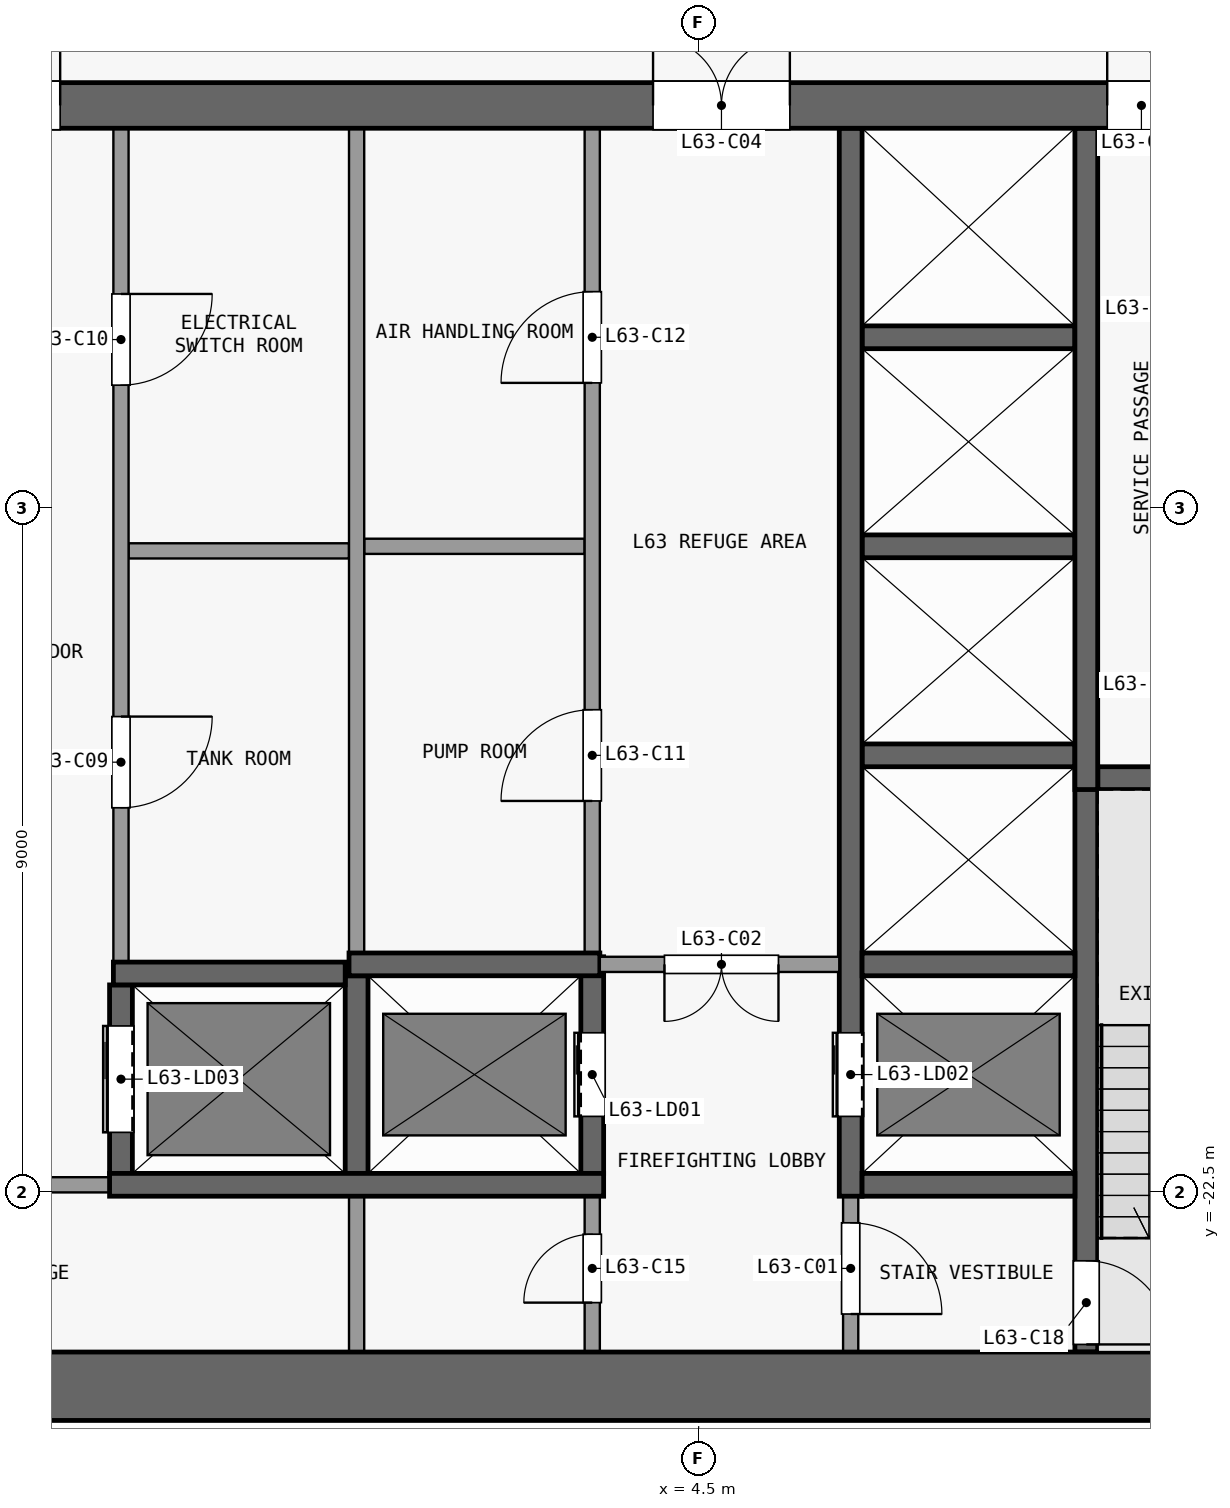
"""IFC4 building model, lengths in metres.
Left out: names, types, materials, properties, quantities, classifications, styles, units other than length and angle.
Written with IfcOpenShell. Run it as: python <this file> out.ifc"""

import sys

from ifc_helpers import new_model, si_unit, direction, frame, frame_2d, origin, place, context, subcontext, project, spatial, rectangle, extrude, element, fill, save


model = new_model("IFC4")
c1 = context("Model", 3, precision=1e-05, world=origin(), true_north=direction((0.0, 1.0)))
c2 = subcontext(c1, "Body", "Model", "MODEL_VIEW")
j1 = project(units=[si_unit("LENGTHUNIT", "METRE"), si_unit("PLANEANGLEUNIT", "RADIAN")], contexts=[c1])
p1 = place(None, origin())
s1 = spatial("IfcSite", under=j1, at=p1, CompositionType="ELEMENT")
p2 = place(p1, origin())
s2 = spatial("IfcBuilding", under=s1, at=p2, CompositionType="ELEMENT")
p3 = place(p2, frame((0.0, 0.0, 248.3)))
s3 = spatial("IfcBuildingStorey", under=s2, at=p3, CompositionType="ELEMENT", Elevation=248.3)
p4 = place(p3, frame((-13.5, -25.05, 0.0), z_axis=(0.0, 0.0, 1.0), x_axis=(1.0, 0.0, 0.0)))
e1 = element("IfcWall", 1, at=p4, inside=s3, PredefinedType="SHEAR", context=c2, shape_type="SweptSolid", body=[
    extrude(rectangle(XDim=27.0, YDim=0.9, at=frame_2d((13.5, 0.0))), origin(), (0.0, 0.0, 1.0), 6.9),
])
p5 = place(p3, frame((-13.5, -8.2, 0.0), z_axis=(0.0, 0.0, 1.0), x_axis=(1.0, 0.0, 0.0)))
e2 = element("IfcWall", 2, at=p5, inside=s3, PredefinedType="SHEAR", context=c2, shape_type="SweptSolid", body=[
    extrude(rectangle(XDim=27.0, YDim=0.6, at=frame_2d((13.5, 0.0))), origin(), (0.0, 0.0, 1.0), 6.9),
])
p6 = place(p5, frame((7.8, 0.0, 0.0)))
e3 = element("IfcOpeningElement", 3, at=p6, cuts=e2, PredefinedType="OPENING", context=c2, shape_type="SweptSolid", body=[
    extrude(rectangle(XDim=1.8, YDim=2.1, at=frame_2d((0.9, 1.05))), frame((0.0, 0.31, 0.0), z_axis=(0.0, -1.0, 0.0), x_axis=(1.0, 0.0, 0.0)), (0.0, 0.0, 1.0), 0.62),
])
p7 = place(p5, frame((17.4, 0.0, 0.0)))
e4 = element("IfcOpeningElement", 4, at=p7, cuts=e2, PredefinedType="OPENING", context=c2, shape_type="SweptSolid", body=[
    extrude(rectangle(XDim=1.8, YDim=2.1, at=frame_2d((0.9, 1.05))), frame((0.0, 0.31, 0.0), z_axis=(0.0, -1.0, 0.0), x_axis=(1.0, 0.0, 0.0)), (0.0, 0.0, 1.0), 0.62),
])
p8 = place(p5, frame((1.725, 0.0, 0.0)))
e5 = element("IfcOpeningElement", 5, at=p8, cuts=e2, PredefinedType="OPENING", context=c2, shape_type="SweptSolid", body=[
    extrude(rectangle(XDim=1.2, YDim=2.1, at=frame_2d((0.6, 1.05))), frame((0.0, 0.31, 0.0), z_axis=(0.0, -1.0, 0.0), x_axis=(1.0, 0.0, 0.0)), (0.0, 0.0, 1.0), 0.62),
])
p9 = place(p5, frame((23.375, 0.0, 0.0)))
e6 = element("IfcOpeningElement", 6, at=p9, cuts=e2, PredefinedType="OPENING", context=c2, shape_type="SweptSolid", body=[
    extrude(rectangle(XDim=0.9, YDim=2.1, at=frame_2d((0.45, 1.05))), frame((0.0, 0.31, 0.0), z_axis=(0.0, -1.0, 0.0), x_axis=(1.0, 0.0, 0.0)), (0.0, 0.0, 1.0), 0.62),
])
p10 = place(p3, frame((-3.25, -22.4, 0.0), z_axis=(0.0, 0.0, 1.0), x_axis=(-1.0, 0.0, 0.0)))
e7 = element("IfcWall", 7, at=p10, inside=s3, PredefinedType="PARTITIONING", context=c2, shape_type="SweptSolid", body=[
    extrude(rectangle(XDim=3.15, YDim=0.2, at=frame_2d((1.575, 0.0))), origin(), (0.0, 0.0, 1.0), 6.9),
])
p11 = place(p10, frame((0.8, 0.0, 0.0)))
e8 = element("IfcOpeningElement", 8, at=p11, cuts=e7, PredefinedType="OPENING", context=c2, shape_type="SweptSolid", body=[
    extrude(rectangle(XDim=1.5, YDim=2.1, at=frame_2d((0.75, 1.05))), frame((0.0, 0.11, 0.0), z_axis=(0.0, -1.0, 0.0), x_axis=(1.0, 0.0, 0.0)), (0.0, 0.0, 1.0), 0.22),
])
p12 = place(p3, frame((-3.25, -22.4, 0.0), z_axis=(0.0, 0.0, 1.0), x_axis=(1.0, 0.0, 0.0)))
e9 = element("IfcWall", 9, at=p12, inside=s3, PredefinedType="SHEAR", context=c2, shape_type="SweptSolid", body=[
    extrude(rectangle(XDim=6.5, YDim=0.3, at=frame_2d((3.25, 0.0))), origin(), (0.0, 0.0, 1.0), 6.9),
])
p13 = place(p3, frame((6.65, -22.4, 0.0), z_axis=(0.0, 0.0, 1.0), x_axis=(1.0, 0.0, 0.0)))
e10 = element("IfcWall", 10, at=p13, inside=s3, PredefinedType="SHEAR", context=c2, shape_type="SweptSolid", body=[
    extrude(rectangle(XDim=2.8, YDim=0.3, at=frame_2d((1.4, 0.0))), origin(), (0.0, 0.0, 1.0), 6.9),
])
p14 = place(p3, frame((-3.2, -19.62, 0.0), z_axis=(0.0, 0.0, 1.0), x_axis=(1.0, 0.0, 0.0)))
e11 = element("IfcWall", 11, at=p14, inside=s3, PredefinedType="SHEAR", context=c2, shape_type="SweptSolid", body=[
    extrude(rectangle(XDim=3.05, YDim=0.3, at=frame_2d((1.525, 0.0))), origin(), (0.0, 0.0, 1.0), 6.9),
])
p15 = place(p3, frame((-0.1, -19.5, 0.0), z_axis=(0.0, 0.0, 1.0), x_axis=(1.0, 0.0, 0.0)))
e12 = element("IfcWall", 12, at=p15, inside=s3, PredefinedType="SHEAR", context=c2, shape_type="SweptSolid", body=[
    extrude(rectangle(XDim=3.3, YDim=0.3, at=frame_2d((1.65, 0.0))), origin(), (0.0, 0.0, 1.0), 6.9),
])
p16 = place(p3, frame((6.35, -19.5, 0.0), z_axis=(0.0, 0.0, 1.0), x_axis=(-1.0, 0.0, 0.0)))
e13 = element("IfcWall", 13, at=p16, inside=s3, PredefinedType="PARTITIONING", context=c2, shape_type="SweptSolid", body=[
    extrude(rectangle(XDim=3.15, YDim=0.2, at=frame_2d((1.575, 0.0))), origin(), (0.0, 0.0, 1.0), 6.9),
])
p17 = place(p16, frame((0.8, 0.0, 0.0)))
e14 = element("IfcOpeningElement", 14, at=p17, cuts=e13, PredefinedType="OPENING", context=c2, shape_type="SweptSolid", body=[
    extrude(rectangle(XDim=1.5, YDim=2.1, at=frame_2d((0.75, 1.05))), frame((0.0, 0.11, 0.0), z_axis=(0.0, -1.0, 0.0), x_axis=(1.0, 0.0, 0.0)), (0.0, 0.0, 1.0), 0.22),
])
p18 = place(p3, frame((6.65, -19.5, 0.0), z_axis=(0.0, 0.0, 1.0), x_axis=(1.0, 0.0, 0.0)))
e15 = element("IfcWall", 15, at=p18, inside=s3, PredefinedType="SHEAR", context=c2, shape_type="SweptSolid", body=[
    extrude(rectangle(XDim=2.8, YDim=0.3, at=frame_2d((1.4, 0.0))), origin(), (0.0, 0.0, 1.0), 6.9),
])
p19 = place(p3, frame((9.75, -17.05, 0.0), z_axis=(0.0, 0.0, 1.0), x_axis=(1.0, 0.0, 0.0)))
e16 = element("IfcWall", 16, at=p19, inside=s3, PredefinedType="SHEAR", context=c2, shape_type="SweptSolid", body=[
    extrude(rectangle(XDim=2.85, YDim=0.3, at=frame_2d((1.425, 0.0))), origin(), (0.0, 0.0, 1.0), 6.9),
])
p20 = place(p3, frame((6.65, -16.75, 0.0), z_axis=(0.0, 0.0, 1.0), x_axis=(1.0, 0.0, 0.0)))
e17 = element("IfcWall", 17, at=p20, inside=s3, PredefinedType="SHEAR", context=c2, shape_type="SweptSolid", body=[
    extrude(rectangle(XDim=2.8, YDim=0.3, at=frame_2d((1.4, 0.0))), origin(), (0.0, 0.0, 1.0), 6.9),
])
for number, where, z_axis, x_axis in (
    (18, (-3.0, -14.06, 0.0), (0.0, 0.0, 1.0), (1.0, 0.0, 0.0)),
    (19, (0.1, -14.0, 0.0), (0.0, 0.0, 1.0), (1.0, 0.0, 0.0)),
):
    element("IfcWall", number, at=place(p3, frame(where, z_axis=z_axis, x_axis=x_axis)), inside=s3, PredefinedType="PARTITIONING", context=c2, shape_type="SweptSolid", body=[
        extrude(rectangle(XDim=2.9, YDim=0.2, at=frame_2d((1.45, 0.0))), origin(), (0.0, 0.0, 1.0), 6.9),
    ])
for number, where, z_axis, x_axis in (
    (20, (6.65, -14.0, 0.0), (0.0, 0.0, 1.0), (1.0, 0.0, 0.0)),
    (21, (6.65, -11.25, 0.0), (0.0, 0.0, 1.0), (1.0, 0.0, 0.0)),
):
    element("IfcWall", number, at=place(p3, frame(where, z_axis=z_axis, x_axis=x_axis)), inside=s3, PredefinedType="SHEAR", context=c2, shape_type="SweptSolid", body=[
        extrude(rectangle(XDim=2.8, YDim=0.3, at=frame_2d((1.4, 0.0))), origin(), (0.0, 0.0, 1.0), 6.9),
    ])
p21 = place(p3, frame((-3.1, -22.25, 0.0), z_axis=(0.0, 0.0, 1.0), x_axis=(0.0, 1.0, 0.0)))
e22 = element("IfcWall", 22, at=p21, inside=s3, PredefinedType="SHEAR", context=c2, shape_type="SweptSolid", body=[
    extrude(rectangle(XDim=2.48, YDim=0.3, at=frame_2d((1.24, 0.0))), origin(), (0.0, 0.0, 1.0), 6.9),
])
p22 = place(p21, frame((0.54, 0.0, 0.0)))
e23 = element("IfcOpeningElement", 23, at=p22, cuts=e22, PredefinedType="OPENING", context=c2, shape_type="SweptSolid", body=[
    extrude(rectangle(XDim=1.4, YDim=2.1, at=frame_2d((0.7, 1.05))), frame((0.0, 0.16, 0.0), z_axis=(0.0, -1.0, 0.0), x_axis=(1.0, 0.0, 0.0)), (0.0, 0.0, 1.0), 0.32),
])
p23 = place(p3, frame((-3.1, -8.5, 0.0), z_axis=(0.0, 0.0, 1.0), x_axis=(0.0, -1.0, 0.0)))
e24 = element("IfcWall", 24, at=p23, inside=s3, PredefinedType="PARTITIONING", context=c2, shape_type="SweptSolid", body=[
    extrude(rectangle(XDim=10.97, YDim=0.2, at=frame_2d((5.485, 0.0))), origin(), (0.0, 0.0, 1.0), 6.9),
])
p24 = place(p23, frame((7.74, 0.0, 0.0)))
e25 = element("IfcOpeningElement", 25, at=p24, cuts=e24, PredefinedType="OPENING", context=c2, shape_type="SweptSolid", body=[
    extrude(rectangle(XDim=1.2, YDim=2.1, at=frame_2d((0.6, 1.05))), frame((0.0, 0.11, 0.0), z_axis=(0.0, -1.0, 0.0), x_axis=(1.0, 0.0, 0.0)), (0.0, 0.0, 1.0), 0.22),
])
p25 = place(p23, frame((2.18, 0.0, 0.0)))
e26 = element("IfcOpeningElement", 26, at=p25, cuts=e24, PredefinedType="OPENING", context=c2, shape_type="SweptSolid", body=[
    extrude(rectangle(XDim=1.2, YDim=2.1, at=frame_2d((0.6, 1.05))), frame((0.0, 0.11, 0.0), z_axis=(0.0, -1.0, 0.0), x_axis=(1.0, 0.0, 0.0)), (0.0, 0.0, 1.0), 0.22),
])
p26 = place(p3, frame((0.0, -24.6, 0.0), z_axis=(0.0, 0.0, 1.0), x_axis=(0.0, 1.0, 0.0)))
e27 = element("IfcWall", 27, at=p26, inside=s3, PredefinedType="PARTITIONING", context=c2, shape_type="SweptSolid", body=[
    extrude(rectangle(XDim=2.05, YDim=0.2, at=frame_2d((1.025, 0.0))), origin(), (0.0, 0.0, 1.0), 6.9),
])
p27 = place(p3, frame((0.0, -22.25, 0.0), z_axis=(0.0, 0.0, 1.0), x_axis=(0.0, 1.0, 0.0)))
e28 = element("IfcWall", 28, at=p27, inside=s3, PredefinedType="SHEAR", context=c2, shape_type="SweptSolid", body=[
    extrude(rectangle(XDim=2.6, YDim=0.3, at=frame_2d((1.3, 0.0))), origin(), (0.0, 0.0, 1.0), 6.9),
])
p28 = place(p3, frame((0.0, -19.35, 0.0), z_axis=(0.0, 0.0, 1.0), x_axis=(0.0, 1.0, 0.0)))
e29 = element("IfcWall", 29, at=p28, inside=s3, PredefinedType="PARTITIONING", context=c2, shape_type="SweptSolid", body=[
    extrude(rectangle(XDim=10.85, YDim=0.2, at=frame_2d((5.425, 0.0))), origin(), (0.0, 0.0, 1.0), 6.9),
])
p29 = place(p3, frame((3.1, -24.6, 0.0), z_axis=(0.0, 0.0, 1.0), x_axis=(0.0, 1.0, 0.0)))
e30 = element("IfcWall", 30, at=p29, inside=s3, PredefinedType="PARTITIONING", context=c2, shape_type="SweptSolid", body=[
    extrude(rectangle(XDim=2.05, YDim=0.2, at=frame_2d((1.025, 0.0))), origin(), (0.0, 0.0, 1.0), 6.9),
])
p30 = place(p29, frame((0.65, 0.0, 0.0)))
e31 = element("IfcOpeningElement", 31, at=p30, cuts=e30, PredefinedType="OPENING", context=c2, shape_type="SweptSolid", body=[
    extrude(rectangle(XDim=0.9, YDim=2.1, at=frame_2d((0.45, 1.05))), frame((0.0, 0.11, 0.0), z_axis=(0.0, -1.0, 0.0), x_axis=(1.0, 0.0, 0.0)), (0.0, 0.0, 1.0), 0.22),
])
p31 = place(p3, frame((3.1, -22.25, 0.0), z_axis=(0.0, 0.0, 1.0), x_axis=(0.0, 1.0, 0.0)))
e32 = element("IfcWall", 32, at=p31, inside=s3, PredefinedType="SHEAR", context=c2, shape_type="SweptSolid", body=[
    extrude(rectangle(XDim=2.85, YDim=0.3, at=frame_2d((1.425, 0.0))), origin(), (0.0, 0.0, 1.0), 6.9),
])
p32 = place(p31, frame((0.75, 0.0, 0.0)))
e33 = element("IfcOpeningElement", 33, at=p32, cuts=e32, PredefinedType="OPENING", context=c2, shape_type="SweptSolid", body=[
    extrude(rectangle(XDim=1.1, YDim=2.1, at=frame_2d((0.55, 1.05))), frame((0.0, 0.16, 0.0), z_axis=(0.0, -1.0, 0.0), x_axis=(1.0, 0.0, 0.0)), (0.0, 0.0, 1.0), 0.32),
])
p33 = place(p3, frame((3.1, -19.6, 0.0), z_axis=(0.0, 0.0, 1.0), x_axis=(0.0, 1.0, 0.0)))
e34 = element("IfcWall", 34, at=p33, inside=s3, PredefinedType="PARTITIONING", context=c2, shape_type="SweptSolid", body=[
    extrude(rectangle(XDim=11.1, YDim=0.2, at=frame_2d((5.55, 0.0))), origin(), (0.0, 0.0, 1.0), 6.9),
])
p34 = place(p33, frame((2.25, 0.0, 0.0)))
e35 = element("IfcOpeningElement", 35, at=p34, cuts=e34, PredefinedType="OPENING", context=c2, shape_type="SweptSolid", body=[
    extrude(rectangle(XDim=1.2, YDim=2.1, at=frame_2d((0.6, 1.05))), frame((0.0, 0.11, 0.0), z_axis=(0.0, -1.0, 0.0), x_axis=(1.0, 0.0, 0.0)), (0.0, 0.0, 1.0), 0.22),
])
p35 = place(p33, frame((7.75, 0.0, 0.0)))
e36 = element("IfcOpeningElement", 36, at=p35, cuts=e34, PredefinedType="OPENING", context=c2, shape_type="SweptSolid", body=[
    extrude(rectangle(XDim=1.2, YDim=2.1, at=frame_2d((0.6, 1.05))), frame((0.0, 0.11, 0.0), z_axis=(0.0, -1.0, 0.0), x_axis=(1.0, 0.0, 0.0)), (0.0, 0.0, 1.0), 0.22),
])
p36 = place(p3, frame((6.5, -22.55, 0.0), z_axis=(0.0, 0.0, 1.0), x_axis=(0.0, -1.0, 0.0)))
e37 = element("IfcWall", 37, at=p36, inside=s3, PredefinedType="PARTITIONING", context=c2, shape_type="SweptSolid", body=[
    extrude(rectangle(XDim=2.05, YDim=0.2, at=frame_2d((1.025, 0.0))), origin(), (0.0, 0.0, 1.0), 6.9),
])
p37 = place(p36, frame((0.35, 0.0, 0.0)))
e38 = element("IfcOpeningElement", 38, at=p37, cuts=e37, PredefinedType="OPENING", context=c2, shape_type="SweptSolid", body=[
    extrude(rectangle(XDim=1.2, YDim=2.1, at=frame_2d((0.6, 1.05))), frame((0.0, 0.11, 0.0), z_axis=(0.0, -1.0, 0.0), x_axis=(1.0, 0.0, 0.0)), (0.0, 0.0, 1.0), 0.22),
])
p38 = place(p3, frame((6.5, -22.55, 0.0), z_axis=(0.0, 0.0, 1.0), x_axis=(0.0, 1.0, 0.0)))
e39 = element("IfcWall", 39, at=p38, inside=s3, PredefinedType="SHEAR", context=c2, shape_type="SweptSolid", body=[
    extrude(rectangle(XDim=14.05, YDim=0.3, at=frame_2d((7.025, 0.0))), origin(), (0.0, 0.0, 1.0), 6.9),
])
p39 = place(p38, frame((1.05, 0.0, 0.0)))
e40 = element("IfcOpeningElement", 40, at=p39, cuts=e39, PredefinedType="OPENING", context=c2, shape_type="SweptSolid", body=[
    extrude(rectangle(XDim=1.1, YDim=2.1, at=frame_2d((0.55, 1.05))), frame((0.0, 0.16, 0.0), z_axis=(0.0, -1.0, 0.0), x_axis=(1.0, 0.0, 0.0)), (0.0, 0.0, 1.0), 0.32),
])
p40 = place(p3, frame((9.6, -16.9, 0.0), z_axis=(0.0, 0.0, 1.0), x_axis=(0.0, -1.0, 0.0)))
e41 = element("IfcWall", 41, at=p40, inside=s3, PredefinedType="SHEAR", context=c2, shape_type="SweptSolid", body=[
    extrude(rectangle(XDim=7.7, YDim=0.3, at=frame_2d((3.85, 0.0))), origin(), (0.0, 0.0, 1.0), 6.9),
])
p41 = place(p40, frame((6.5, 0.0, 0.0)))
e42 = element("IfcOpeningElement", 42, at=p41, cuts=e41, PredefinedType="OPENING", context=c2, shape_type="SweptSolid", body=[
    extrude(rectangle(XDim=1.1, YDim=2.1, at=frame_2d((0.55, 1.05))), frame((0.0, 0.16, 0.0), z_axis=(0.0, -1.0, 0.0), x_axis=(1.0, 0.0, 0.0)), (0.0, 0.0, 1.0), 0.32),
])
p42 = place(p3, frame((9.6, -17.2, 0.0), z_axis=(0.0, 0.0, 1.0), x_axis=(0.0, 1.0, 0.0)))
e43 = element("IfcWall", 43, at=p42, inside=s3, PredefinedType="SHEAR", context=c2, shape_type="SweptSolid", body=[
    extrude(rectangle(XDim=8.7, YDim=0.3, at=frame_2d((4.35, 0.0))), origin(), (0.0, 0.0, 1.0), 6.9),
])
p43 = place(p32, origin())
e44 = element("IfcDoor", 44, at=p43, inside=s3, OperationType="DOUBLE_DOOR_SLIDING", PredefinedType="DOOR", context=c2, shape_type="SweptSolid", body=[
    extrude(rectangle(XDim=1.1, YDim=2.1, at=frame_2d((0.55, 1.05))), frame((0.0, 0.025, 0.0), z_axis=(0.0, -1.0, 0.0), x_axis=(1.0, 0.0, 0.0)), (0.0, 0.0, 1.0), 0.05),
])
fill(e33, e44)
p44 = place(p39, origin())
e45 = element("IfcDoor", 45, at=p44, inside=s3, OperationType="DOUBLE_DOOR_SLIDING", PredefinedType="DOOR", context=c2, shape_type="SweptSolid", body=[
    extrude(rectangle(XDim=1.1, YDim=2.1, at=frame_2d((0.55, 1.05))), frame((0.0, 0.025, 0.0), z_axis=(0.0, -1.0, 0.0), x_axis=(1.0, 0.0, 0.0)), (0.0, 0.0, 1.0), 0.05),
])
fill(e40, e45)
p45 = place(p22, origin())
e46 = element("IfcDoor", 46, at=p45, inside=s3, OperationType="DOUBLE_DOOR_SLIDING", PredefinedType="DOOR", context=c2, shape_type="SweptSolid", body=[
    extrude(rectangle(XDim=1.4, YDim=2.1, at=frame_2d((0.7, 1.05))), frame((0.0, 0.025, 0.0), z_axis=(0.0, -1.0, 0.0), x_axis=(1.0, 0.0, 0.0)), (0.0, 0.0, 1.0), 0.05),
])
fill(e23, e46)
p46 = place(p37, origin())
e47 = element("IfcDoor", 47, at=p46, inside=s3, OperationType="SINGLE_SWING_RIGHT", PredefinedType="DOOR", context=c2, shape_type="SweptSolid", body=[
    extrude(rectangle(XDim=1.2, YDim=2.1, at=frame_2d((0.6, 1.05))), frame((0.0, 0.025, 0.0), z_axis=(0.0, -1.0, 0.0), x_axis=(1.0, 0.0, 0.0)), (0.0, 0.0, 1.0), 0.05),
])
fill(e38, e47)
p47 = place(p17, origin())
e48 = element("IfcDoor", 48, at=p47, inside=s3, OperationType="DOUBLE_DOOR_SINGLE_SWING", PredefinedType="DOOR", context=c2, shape_type="SweptSolid", body=[
    extrude(rectangle(XDim=1.5, YDim=2.1, at=frame_2d((0.75, 1.05))), frame((0.0, 0.025, 0.0), z_axis=(0.0, -1.0, 0.0), x_axis=(1.0, 0.0, 0.0)), (0.0, 0.0, 1.0), 0.05),
])
fill(e14, e48)
p48 = place(p6, origin())
e49 = element("IfcDoor", 49, at=p48, inside=s3, OperationType="DOUBLE_DOOR_SINGLE_SWING", PredefinedType="DOOR", context=c2, shape_type="SweptSolid", body=[
    extrude(rectangle(XDim=1.8, YDim=2.1, at=frame_2d((0.9, 1.05))), frame((0.0, 0.025, 0.0), z_axis=(0.0, -1.0, 0.0), x_axis=(1.0, 0.0, 0.0)), (0.0, 0.0, 1.0), 0.05),
])
fill(e3, e49)
p49 = place(p7, origin())
e50 = element("IfcDoor", 50, at=p49, inside=s3, OperationType="DOUBLE_DOOR_SINGLE_SWING", PredefinedType="DOOR", context=c2, shape_type="SweptSolid", body=[
    extrude(rectangle(XDim=1.8, YDim=2.1, at=frame_2d((0.9, 1.05))), frame((0.0, 0.025, 0.0), z_axis=(0.0, -1.0, 0.0), x_axis=(1.0, 0.0, 0.0)), (0.0, 0.0, 1.0), 0.05),
])
fill(e4, e50)
p50 = place(p24, origin())
e51 = element("IfcDoor", 51, at=p50, inside=s3, OperationType="SINGLE_SWING_LEFT", PredefinedType="DOOR", context=c2, shape_type="SweptSolid", body=[
    extrude(rectangle(XDim=1.2, YDim=2.1, at=frame_2d((0.6, 1.05))), frame((0.0, 0.025, 0.0), z_axis=(0.0, -1.0, 0.0), x_axis=(1.0, 0.0, 0.0)), (0.0, 0.0, 1.0), 0.05),
])
fill(e25, e51)
p51 = place(p25, origin())
e52 = element("IfcDoor", 52, at=p51, inside=s3, OperationType="SINGLE_SWING_LEFT", PredefinedType="DOOR", context=c2, shape_type="SweptSolid", body=[
    extrude(rectangle(XDim=1.2, YDim=2.1, at=frame_2d((0.6, 1.05))), frame((0.0, 0.025, 0.0), z_axis=(0.0, -1.0, 0.0), x_axis=(1.0, 0.0, 0.0)), (0.0, 0.0, 1.0), 0.05),
])
fill(e26, e52)
p52 = place(p34, origin())
e53 = element("IfcDoor", 53, at=p52, inside=s3, OperationType="SINGLE_SWING_LEFT", PredefinedType="DOOR", context=c2, shape_type="SweptSolid", body=[
    extrude(rectangle(XDim=1.2, YDim=2.1, at=frame_2d((0.6, 1.05))), frame((0.0, 0.025, 0.0), z_axis=(0.0, -1.0, 0.0), x_axis=(1.0, 0.0, 0.0)), (0.0, 0.0, 1.0), 0.05),
])
fill(e35, e53)
p53 = place(p35, origin())
e54 = element("IfcDoor", 54, at=p53, inside=s3, OperationType="SINGLE_SWING_LEFT", PredefinedType="DOOR", context=c2, shape_type="SweptSolid", body=[
    extrude(rectangle(XDim=1.2, YDim=2.1, at=frame_2d((0.6, 1.05))), frame((0.0, 0.025, 0.0), z_axis=(0.0, -1.0, 0.0), x_axis=(1.0, 0.0, 0.0)), (0.0, 0.0, 1.0), 0.05),
])
fill(e36, e54)
p54 = place(p9, origin())
e55 = element("IfcDoor", 55, at=p54, inside=s3, OperationType="SINGLE_SWING_LEFT", PredefinedType="DOOR", context=c2, shape_type="SweptSolid", body=[
    extrude(rectangle(XDim=0.9, YDim=2.1, at=frame_2d((0.45, 1.05))), frame((0.0, 0.025, 0.0), z_axis=(0.0, -1.0, 0.0), x_axis=(1.0, 0.0, 0.0)), (0.0, 0.0, 1.0), 0.05),
])
fill(e6, e55)
p55 = place(p30, origin())
e56 = element("IfcDoor", 56, at=p55, inside=s3, OperationType="SINGLE_SWING_LEFT", PredefinedType="DOOR", context=c2, shape_type="SweptSolid", body=[
    extrude(rectangle(XDim=0.9, YDim=2.1, at=frame_2d((0.45, 1.05))), frame((0.0, 0.025, 0.0), z_axis=(0.0, -1.0, 0.0), x_axis=(1.0, 0.0, 0.0)), (0.0, 0.0, 1.0), 0.05),
])
fill(e31, e56)
p56 = place(p41, origin())
e57 = element("IfcDoor", 57, at=p56, inside=s3, OperationType="SINGLE_SWING_RIGHT", PredefinedType="DOOR", context=c2, shape_type="SweptSolid", body=[
    extrude(rectangle(XDim=1.1, YDim=2.1, at=frame_2d((0.55, 1.05))), frame((0.0, 0.025, 0.0), z_axis=(0.0, -1.0, 0.0), x_axis=(1.0, 0.0, 0.0)), (0.0, 0.0, 1.0), 0.05),
])
fill(e42, e57)
save(model, sys.argv[1])
